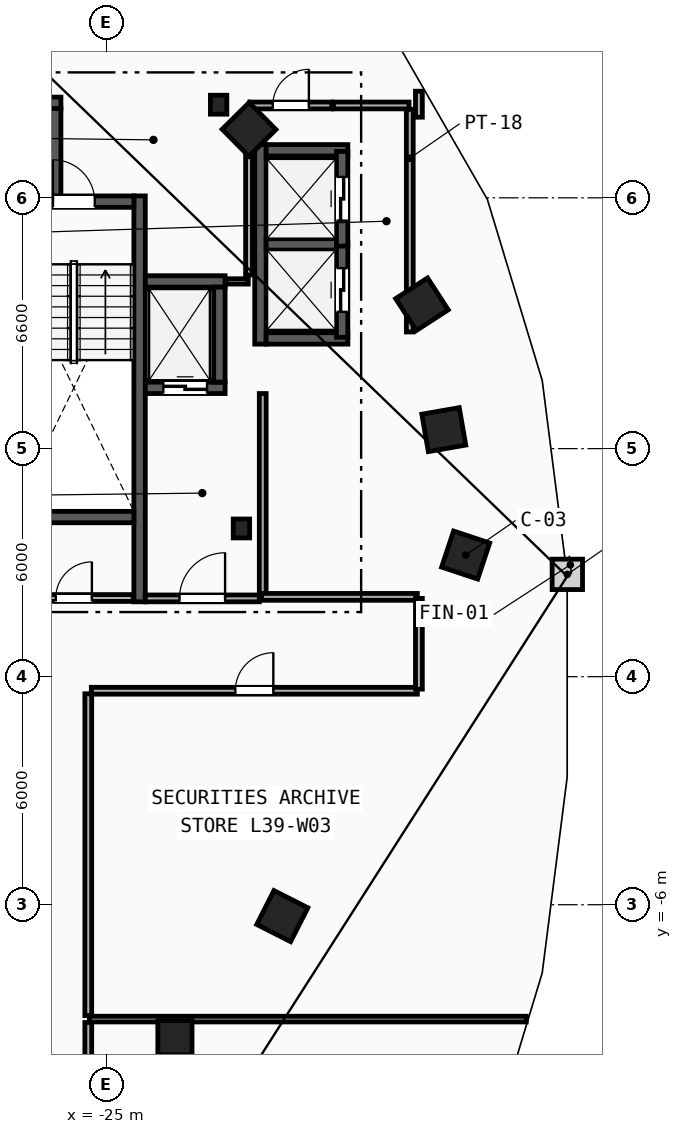
"""IFC4 building model, lengths in metres.
Left out: names, types, materials, properties, quantities, classifications, styles, units other than length and angle.
Written with IfcOpenShell. Run it as: python <this file> out.ifc"""

import sys

from ifc_helpers import new_model, si_unit, direction, frame, frame_2d, origin, origin_2d, place, context, subcontext, project, spatial, rectangle, i_section, extrude, element, fill, save


model = new_model("IFC4")
c1 = context("Model", 3, precision=1e-05, world=origin(), true_north=direction((0.0, 1.0)))
c2 = subcontext(c1, "Body", "Model", "MODEL_VIEW")
j1 = project(units=[si_unit("LENGTHUNIT", "METRE"), si_unit("PLANEANGLEUNIT", "RADIAN")], contexts=[c1])
p1 = place(None, origin())
s1 = spatial("IfcSite", under=j1, at=p1, CompositionType="ELEMENT")
p2 = place(p1, origin())
s2 = spatial("IfcBuilding", under=s1, at=p2, CompositionType="ELEMENT")
p3 = place(p2, frame((0.0, 0.0, 151.2)))
s3 = spatial("IfcBuildingStorey", under=s2, at=p3, CompositionType="ELEMENT", Elevation=151.2)
for number, where, z_axis, x_axis in (
    (1, (-21.45, 3.9, 0.0), (0.0, 0.0, 1.0), (1.0, 0.0, 0.0)),
    (2, (-22.05, 15.05, 0.0), (0.0, 0.0, 1.0), (1.0, 0.0, 0.0)),
):
    element("IfcColumn", number, at=place(p3, frame(where, z_axis=z_axis, x_axis=x_axis)), inside=s3, PredefinedType="COLUMN", context=c2, shape_type="SweptSolid", body=[
        extrude(i_section(OverallWidth=0.432, OverallDepth=0.498, WebThickness=0.056, FlangeThickness=0.089, FilletRadius=0.018, at=origin_2d()), origin(), (0.0, 0.0, 1.0), 3.6),
    ])
p4 = place(p3, frame((-23.2, -9.5, 0.0), z_axis=(0.0, 0.0, 1.0), x_axis=(1.0, 0.0, 0.0)))
e3 = element("IfcColumn", 3, at=p4, inside=s3, PredefinedType="COLUMN", context=c2, shape_type="SweptSolid", body=[
    extrude(rectangle(XDim=0.9, YDim=0.9, at=origin_2d()), origin(), (0.0, 0.0, 1.0), 3.6),
])
for number, where, z_axis, x_axis in (
    (4, (-15.55, 3.2, 0.0), (0.0, 0.0, 1.0), (0.315, 0.949, 0.0)),
    (5, (-16.125, 6.5, 0.0), (0.0, 0.0, 1.0), (-0.172, 0.985, 0.0)),
    (6, (-16.7, 9.8, 0.0), (0.0, 0.0, 1.0), (-0.544, 0.839, 0.0)),
    (7, (-21.25, 14.4, 0.0), (0.0, 0.0, 1.0), (-0.703, 0.711, 0.0)),
    (8, (-20.375, -6.3, 0.0), (0.0, 0.0, 1.0), (0.453, 0.892, 0.0)),
):
    element("IfcColumn", number, at=place(p3, frame(where, z_axis=z_axis, x_axis=x_axis)), inside=s3, PredefinedType="COLUMN", context=c2, shape_type="SweptSolid", body=[
        extrude(rectangle(XDim=1.0, YDim=1.0, at=origin_2d()), origin(), (0.0, 0.0, 1.0), 3.6),
    ])
p5 = place(p3, frame((-24.13, 1.97, 0.0), z_axis=(0.0, 0.0, 1.0), x_axis=(0.0, 1.0, 0.0)))
e9 = element("IfcWall", 9, at=p5, inside=s3, PredefinedType="SHEAR", context=c2, shape_type="SweptSolid", body=[
    extrude(rectangle(XDim=10.68, YDim=0.3, at=frame_2d((5.34, 0.0))), origin(), (0.0, 0.0, 1.0), 3.36),
])
p6 = place(p3, frame((-27.44, 12.5, 0.0), z_axis=(0.0, 0.0, 1.0), x_axis=(1.0, 0.0, 0.0)))
e10 = element("IfcWall", 10, at=p6, inside=s3, PredefinedType="SHEAR", context=c2, shape_type="SweptSolid", body=[
    extrude(rectangle(XDim=3.16, YDim=0.3, at=frame_2d((1.58, 0.0))), origin(), (0.0, 0.0, 1.0), 3.36),
])
p7 = place(p6, frame((1.03, 0.0, 0.0)))
e11 = element("IfcOpeningElement", 11, at=p7, cuts=e10, PredefinedType="OPENING", context=c2, shape_type="SweptSolid", body=[
    extrude(rectangle(XDim=1.1, YDim=2.15, at=frame_2d((0.55, 1.075))), frame((0.0, 0.16, 0.0), z_axis=(0.0, -1.0, 0.0), x_axis=(1.0, 0.0, 0.0)), (0.0, 0.0, 1.0), 0.32),
])
p8 = place(p3, frame((-27.44, 4.2, 0.0), z_axis=(0.0, 0.0, 1.0), x_axis=(1.0, 0.0, 0.0)))
e12 = element("IfcWall", 12, at=p8, inside=s3, PredefinedType="SHEAR", context=c2, shape_type="SweptSolid", body=[
    extrude(rectangle(XDim=3.16, YDim=0.3, at=frame_2d((1.58, 0.0))), origin(), (0.0, 0.0, 1.0), 3.36),
])
p9 = place(p3, frame((-20.89, 2.15, 0.0), z_axis=(0.0, 0.0, 1.0), x_axis=(0.0, 1.0, 0.0)))
e13 = element("IfcWall", 13, at=p9, inside=s3, PredefinedType="PARTITIONING", context=c2, shape_type="SweptSolid", body=[
    extrude(rectangle(XDim=5.3, YDim=0.18, at=frame_2d((2.65, 0.0))), origin(), (0.0, 0.0, 1.0), 3.36),
])
p10 = place(p3, frame((-23.98, 2.06, 0.0), z_axis=(0.0, 0.0, 1.0), x_axis=(1.0, 0.0, 0.0)))
e14 = element("IfcWall", 14, at=p10, inside=s3, PredefinedType="PARTITIONING", context=c2, shape_type="SweptSolid", body=[
    extrude(rectangle(XDim=3.0, YDim=0.18, at=frame_2d((1.5, 0.0))), origin(), (0.0, 0.0, 1.0), 3.36),
])
p11 = place(p10, frame((0.9, 0.0, 0.0)))
e15 = element("IfcOpeningElement", 15, at=p11, cuts=e14, PredefinedType="OPENING", context=c2, shape_type="SweptSolid", body=[
    extrude(rectangle(XDim=1.2, YDim=2.15, at=frame_2d((0.6, 1.075))), frame((0.0, 0.1, 0.0), z_axis=(0.0, -1.0, 0.0), x_axis=(1.0, 0.0, 0.0)), (0.0, 0.0, 1.0), 0.2),
])
p12 = place(p3, frame((-23.98, 7.6, 0.0), z_axis=(0.0, 0.0, 1.0), x_axis=(1.0, 0.0, 0.0)))
e16 = element("IfcWall", 16, at=p12, inside=s3, PredefinedType="SHEAR", context=c2, shape_type="SweptSolid", body=[
    extrude(rectangle(XDim=2.1, YDim=0.3, at=frame_2d((1.05, 0.0))), origin(), (0.0, 0.0, 1.0), 3.36),
])
p13 = place(p12, frame((0.475, 0.0, 0.0)))
e17 = element("IfcOpeningElement", 17, at=p13, cuts=e16, PredefinedType="OPENING", context=c2, shape_type="SweptSolid", body=[
    extrude(rectangle(XDim=1.15, YDim=2.2, at=frame_2d((0.575, 1.1))), frame((0.0, 0.16, 0.0), z_axis=(0.0, -1.0, 0.0), x_axis=(1.0, 0.0, 0.0)), (0.0, 0.0, 1.0), 0.32),
])
p14 = place(p3, frame((-23.98, 10.4, 0.0), z_axis=(0.0, 0.0, 1.0), x_axis=(1.0, 0.0, 0.0)))
e18 = element("IfcWall", 18, at=p14, inside=s3, PredefinedType="SHEAR", context=c2, shape_type="SweptSolid", body=[
    extrude(rectangle(XDim=2.1, YDim=0.3, at=frame_2d((1.05, 0.0))), origin(), (0.0, 0.0, 1.0), 3.36),
])
for number, where, z_axis, x_axis in (
    (19, (-22.03, 7.75, 0.0), (0.0, 0.0, 1.0), (0.0, 1.0, 0.0)),
    (20, (-28.7, 15.1, 0.0), (0.0, 0.0, 1.0), (1.0, 0.0, 0.0)),
):
    element("IfcWall", number, at=place(p3, frame(where, z_axis=z_axis, x_axis=x_axis)), inside=s3, PredefinedType="SHEAR", context=c2, shape_type="SweptSolid", body=[
        extrude(rectangle(XDim=2.5, YDim=0.3, at=frame_2d((1.25, 0.0))), origin(), (0.0, 0.0, 1.0), 3.36),
    ])
p15 = place(p3, frame((-26.35, 12.65, 0.0), z_axis=(0.0, 0.0, 1.0), x_axis=(0.0, 1.0, 0.0)))
e21 = element("IfcWall", 21, at=p15, inside=s3, PredefinedType="SHEAR", context=c2, shape_type="SweptSolid", body=[
    extrude(rectangle(XDim=2.3, YDim=0.3, at=frame_2d((1.15, 0.0))), origin(), (0.0, 0.0, 1.0), 3.36),
])
p16 = place(p3, frame((-20.95, 8.75, 0.0), z_axis=(0.0, 0.0, 1.0), x_axis=(0.0, 1.0, 0.0)))
e22 = element("IfcWall", 22, at=p16, inside=s3, PredefinedType="SHEAR", context=c2, shape_type="SweptSolid", body=[
    extrude(rectangle(XDim=5.25, YDim=0.3, at=frame_2d((2.625, 0.0))), origin(), (0.0, 0.0, 1.0), 3.36),
])
for number, where, z_axis, x_axis in (
    (23, (-20.8, 8.9, 0.0), (0.0, 0.0, 1.0), (1.0, 0.0, 0.0)),
    (24, (-20.8, 13.85, 0.0), (0.0, 0.0, 1.0), (1.0, 0.0, 0.0)),
):
    element("IfcWall", number, at=place(p3, frame(where, z_axis=z_axis, x_axis=x_axis)), inside=s3, PredefinedType="SHEAR", context=c2, shape_type="SweptSolid", body=[
        extrude(rectangle(XDim=2.15, YDim=0.3, at=frame_2d((1.075, 0.0))), origin(), (0.0, 0.0, 1.0), 3.36),
    ])
p17 = place(p3, frame((-20.8, 11.375, 0.0), z_axis=(0.0, 0.0, 1.0), x_axis=(1.0, 0.0, 0.0)))
e25 = element("IfcWall", 25, at=p17, inside=s3, PredefinedType="SHEAR", context=c2, shape_type="SweptSolid", body=[
    extrude(rectangle(XDim=1.85, YDim=0.3, at=frame_2d((0.925, 0.0))), origin(), (0.0, 0.0, 1.0), 3.36),
])
p18 = place(p3, frame((-18.8, 8.93, 0.0), z_axis=(0.0, 0.0, 1.0), x_axis=(0.0, 1.0, 0.0)))
e26 = element("IfcWall", 26, at=p18, inside=s3, PredefinedType="SHEAR", context=c2, shape_type="SweptSolid", body=[
    extrude(rectangle(XDim=2.49, YDim=0.3, at=frame_2d((1.245, 0.0))), origin(), (0.0, 0.0, 1.0), 3.36),
])
p19 = place(p18, frame((0.67, 0.0, 0.0)))
e27 = element("IfcOpeningElement", 27, at=p19, cuts=e26, PredefinedType="OPENING", context=c2, shape_type="SweptSolid", body=[
    extrude(rectangle(XDim=1.15, YDim=2.2, at=frame_2d((0.575, 1.1))), frame((0.0, 0.16, 0.0), z_axis=(0.0, -1.0, 0.0), x_axis=(1.0, 0.0, 0.0)), (0.0, 0.0, 1.0), 0.32),
])
p20 = place(p3, frame((-18.8, 11.33, 0.0), z_axis=(0.0, 0.0, 1.0), x_axis=(0.0, 1.0, 0.0)))
e28 = element("IfcWall", 28, at=p20, inside=s3, PredefinedType="SHEAR", context=c2, shape_type="SweptSolid", body=[
    extrude(rectangle(XDim=2.49, YDim=0.3, at=frame_2d((1.245, 0.0))), origin(), (0.0, 0.0, 1.0), 3.36),
])
p21 = place(p20, frame((0.67, 0.0, 0.0)))
e29 = element("IfcOpeningElement", 29, at=p21, cuts=e28, PredefinedType="OPENING", context=c2, shape_type="SweptSolid", body=[
    extrude(rectangle(XDim=1.15, YDim=2.2, at=frame_2d((0.575, 1.1))), frame((0.0, 0.16, 0.0), z_axis=(0.0, -1.0, 0.0), x_axis=(1.0, 0.0, 0.0)), (0.0, 0.0, 1.0), 0.32),
])
p22 = place(p3, frame((-17.02, 9.07, 0.0), z_axis=(0.0, 0.0, 1.0), x_axis=(0.0, 1.0, 0.0)))
e30 = element("IfcWall", 30, at=p22, inside=s3, PredefinedType="PARTITIONING", context=c2, shape_type="SweptSolid", body=[
    extrude(rectangle(XDim=5.86, YDim=0.18, at=frame_2d((2.93, 0.0))), origin(), (0.0, 0.0, 1.0), 3.36),
])
p23 = place(p3, frame((-21.23, 15.03, 0.0), z_axis=(0.0, 0.0, 1.0), x_axis=(1.0, 0.0, 0.0)))
e31 = element("IfcWall", 31, at=p23, inside=s3, PredefinedType="PARTITIONING", context=c2, shape_type="SweptSolid", body=[
    extrude(rectangle(XDim=2.16, YDim=0.18, at=frame_2d((1.08, 0.0))), origin(), (0.0, 0.0, 1.0), 3.36),
])
p24 = place(p23, frame((0.605, 0.0, 0.0)))
e32 = element("IfcOpeningElement", 32, at=p24, cuts=e31, PredefinedType="OPENING", context=c2, shape_type="SweptSolid", body=[
    extrude(rectangle(XDim=0.95, YDim=2.1, at=frame_2d((0.475, 1.05))), frame((0.0, 0.1, 0.0), z_axis=(0.0, -1.0, 0.0), x_axis=(1.0, 0.0, 0.0)), (0.0, 0.0, 1.0), 0.2),
])
p25 = place(p3, frame((-19.03, 15.03, 0.0), z_axis=(0.0, 0.0, 1.0), x_axis=(1.0, 0.0, 0.0)))
e33 = element("IfcWall", 33, at=p25, inside=s3, PredefinedType="PARTITIONING", context=c2, shape_type="SweptSolid", body=[
    extrude(rectangle(XDim=1.99, YDim=0.18, at=frame_2d((0.995, 0.0))), origin(), (0.0, 0.0, 1.0), 3.36),
])
p26 = place(p3, frame((-21.86, 10.4, 0.0), z_axis=(0.0, 0.0, 1.0), x_axis=(1.0, 0.0, 0.0)))
e34 = element("IfcWall", 34, at=p26, inside=s3, PredefinedType="PARTITIONING", context=c2, shape_type="SweptSolid", body=[
    extrude(rectangle(XDim=0.59, YDim=0.14, at=frame_2d((0.295, 0.0))), origin(), (0.0, 0.0, 1.0), 3.36),
])
p27 = place(p3, frame((-21.25, 10.57, 0.0), z_axis=(0.0, 0.0, 1.0), x_axis=(0.0, 1.0, 0.0)))
e35 = element("IfcWall", 35, at=p27, inside=s3, PredefinedType="PARTITIONING", context=c2, shape_type="SweptSolid", body=[
    extrude(rectangle(XDim=4.36, YDim=0.18, at=frame_2d((2.18, 0.0))), origin(), (0.0, 0.0, 1.0), 3.36),
])
p28 = place(p3, frame((-27.42, 2.07, 0.0), z_axis=(0.0, 0.0, 1.0), x_axis=(1.0, 0.0, 0.0)))
e36 = element("IfcWall", 36, at=p28, inside=s3, PredefinedType="PARTITIONING", context=c2, shape_type="SweptSolid", body=[
    extrude(rectangle(XDim=3.12, YDim=0.18, at=frame_2d((1.56, 0.0))), origin(), (0.0, 0.0, 1.0), 3.36),
])
p29 = place(p28, frame((1.085, 0.0, 0.0)))
e37 = element("IfcOpeningElement", 37, at=p29, cuts=e36, PredefinedType="OPENING", context=c2, shape_type="SweptSolid", body=[
    extrude(rectangle(XDim=0.95, YDim=2.1, at=frame_2d((0.475, 1.05))), frame((0.0, 0.1, 0.0), z_axis=(0.0, -1.0, 0.0), x_axis=(1.0, 0.0, 0.0)), (0.0, 0.0, 1.0), 0.2),
])
p30 = place(p3, frame((-25.45, -9.01, 0.0), z_axis=(0.0, 0.0, 1.0), x_axis=(1.0, 0.0, 0.0)))
e38 = element("IfcWall", 38, at=p30, inside=s3, PredefinedType="PARTITIONING", context=c2, shape_type="SweptSolid", body=[
    extrude(rectangle(XDim=11.495, YDim=0.15, at=frame_2d((5.748, 0.0))), origin(), (0.0, 0.0, 1.0), 3.36),
])
p31 = place(p3, frame((-25.48, -11.178, 0.0), z_axis=(0.0, 0.0, 1.0), x_axis=(0.0, 1.0, 0.0)))
e39 = element("IfcWall", 39, at=p31, inside=s3, PredefinedType="PARTITIONING", context=c2, shape_type="SweptSolid", body=[
    extrude(rectangle(XDim=2.078, YDim=0.18, at=frame_2d((1.039, 0.0))), origin(), (0.0, 0.0, 1.0), 3.36),
])
p32 = place(p3, frame((-25.4, -0.37, 0.0), z_axis=(0.0, 0.0, 1.0), x_axis=(1.0, 0.0, 0.0)))
e40 = element("IfcWall", 40, at=p32, inside=s3, PredefinedType="PARTITIONING", context=c2, shape_type="SweptSolid", body=[
    extrude(rectangle(XDim=8.578, YDim=0.18, at=frame_2d((4.289, 0.0))), origin(), (0.0, 0.0, 1.0), 3.36),
])
p33 = place(p32, frame((3.789, 0.0, 0.0)))
e41 = element("IfcOpeningElement", 41, at=p33, cuts=e40, PredefinedType="OPENING", context=c2, shape_type="SweptSolid", body=[
    extrude(rectangle(XDim=1.0, YDim=2.15, at=frame_2d((0.5, 1.075))), frame((0.0, 0.1, 0.0), z_axis=(0.0, -1.0, 0.0), x_axis=(1.0, 0.0, 0.0)), (0.0, 0.0, 1.0), 0.2),
])
p34 = place(p3, frame((-25.48, -8.92, 0.0), z_axis=(0.0, 0.0, 1.0), x_axis=(0.0, 1.0, 0.0)))
e42 = element("IfcWall", 42, at=p34, inside=s3, PredefinedType="PARTITIONING", context=c2, shape_type="SweptSolid", body=[
    extrude(rectangle(XDim=8.47, YDim=0.18, at=frame_2d((4.235, 0.0))), origin(), (0.0, 0.0, 1.0), 3.36),
])
p35 = place(p3, frame((-16.822, 2.1, 0.0), z_axis=(0.0, 0.0, 1.0), x_axis=(-1.0, 0.0, 0.0)))
e43 = element("IfcWall", 43, at=p35, inside=s3, PredefinedType="PARTITIONING", context=c2, shape_type="SweptSolid", body=[
    extrude(rectangle(XDim=4.098, YDim=0.18, at=frame_2d((2.049, 0.0))), origin(), (0.0, 0.0, 1.0), 3.36),
])
p36 = place(p3, frame((-16.78, -0.329, 0.0), z_axis=(0.0, 0.0, 1.0), x_axis=(0.0, 1.0, 0.0)))
e44 = element("IfcWall", 44, at=p36, inside=s3, PredefinedType="PARTITIONING", context=c2, shape_type="SweptSolid", body=[
    extrude(rectangle(XDim=2.387, YDim=0.18, at=frame_2d((1.194, 0.0))), origin(), (0.0, 0.0, 1.0), 3.36),
])
p37 = place(p3, frame((-16.78, 14.721, 0.0), z_axis=(0.0, 0.0, 1.0), x_axis=(0.0, 1.0, 0.0)))
e45 = element("IfcWall", 45, at=p37, inside=s3, PredefinedType="PARTITIONING", context=c2, shape_type="SweptSolid", body=[
    extrude(rectangle(XDim=0.684, YDim=0.18, at=frame_2d((0.342, 0.0))), origin(), (0.0, 0.0, 1.0), 3.36),
])
p38 = place(p7, origin())
e46 = element("IfcDoor", 46, at=p38, inside=s3, OperationType="SINGLE_SWING_LEFT", PredefinedType="DOOR", context=c2, shape_type="SweptSolid", body=[
    extrude(rectangle(XDim=1.1, YDim=2.15, at=frame_2d((0.55, 1.075))), frame((0.0, 0.025, 0.0), z_axis=(0.0, -1.0, 0.0), x_axis=(1.0, 0.0, 0.0)), (0.0, 0.0, 1.0), 0.05),
])
fill(e11, e46)
p39 = place(p11, origin())
e47 = element("IfcDoor", 47, at=p39, inside=s3, OperationType="SINGLE_SWING_RIGHT", PredefinedType="DOOR", context=c2, shape_type="SweptSolid", body=[
    extrude(rectangle(XDim=1.2, YDim=2.15, at=frame_2d((0.6, 1.075))), frame((0.0, 0.025, 0.0), z_axis=(0.0, -1.0, 0.0), x_axis=(1.0, 0.0, 0.0)), (0.0, 0.0, 1.0), 0.05),
])
fill(e15, e47)
p40 = place(p13, origin())
e48 = element("IfcDoor", 48, at=p40, inside=s3, OperationType="SLIDING_TO_LEFT", PredefinedType="TRAPDOOR", context=c2, shape_type="SweptSolid", body=[
    extrude(rectangle(XDim=1.15, YDim=2.2, at=frame_2d((0.575, 1.1))), frame((0.0, 0.025, 0.0), z_axis=(0.0, -1.0, 0.0), x_axis=(1.0, 0.0, 0.0)), (0.0, 0.0, 1.0), 0.05),
])
fill(e17, e48)
p41 = place(p19, origin())
e49 = element("IfcDoor", 49, at=p41, inside=s3, OperationType="SLIDING_TO_LEFT", PredefinedType="TRAPDOOR", context=c2, shape_type="SweptSolid", body=[
    extrude(rectangle(XDim=1.15, YDim=2.2, at=frame_2d((0.575, 1.1))), frame((0.0, 0.025, 0.0), z_axis=(0.0, -1.0, 0.0), x_axis=(1.0, 0.0, 0.0)), (0.0, 0.0, 1.0), 0.05),
])
fill(e27, e49)
p42 = place(p21, origin())
e50 = element("IfcDoor", 50, at=p42, inside=s3, OperationType="SLIDING_TO_LEFT", PredefinedType="TRAPDOOR", context=c2, shape_type="SweptSolid", body=[
    extrude(rectangle(XDim=1.15, YDim=2.2, at=frame_2d((0.575, 1.1))), frame((0.0, 0.025, 0.0), z_axis=(0.0, -1.0, 0.0), x_axis=(1.0, 0.0, 0.0)), (0.0, 0.0, 1.0), 0.05),
])
fill(e29, e50)
p43 = place(p33, origin())
e51 = element("IfcDoor", 51, at=p43, inside=s3, OperationType="SINGLE_SWING_RIGHT", PredefinedType="DOOR", context=c2, shape_type="SweptSolid", body=[
    extrude(rectangle(XDim=1.0, YDim=2.15, at=frame_2d((0.5, 1.075))), frame((0.0, 0.025, 0.0), z_axis=(0.0, -1.0, 0.0), x_axis=(1.0, 0.0, 0.0)), (0.0, 0.0, 1.0), 0.05),
])
fill(e41, e51)
p44 = place(p29, origin())
e52 = element("IfcDoor", 52, at=p44, inside=s3, OperationType="SINGLE_SWING_RIGHT", PredefinedType="DOOR", context=c2, shape_type="SweptSolid", body=[
    extrude(rectangle(XDim=0.95, YDim=2.1, at=frame_2d((0.475, 1.05))), frame((0.0, 0.025, 0.0), z_axis=(0.0, -1.0, 0.0), x_axis=(1.0, 0.0, 0.0)), (0.0, 0.0, 1.0), 0.05),
])
fill(e37, e52)
p45 = place(p24, origin())
e53 = element("IfcDoor", 53, at=p45, inside=s3, OperationType="SINGLE_SWING_RIGHT", PredefinedType="DOOR", context=c2, shape_type="SweptSolid", body=[
    extrude(rectangle(XDim=0.95, YDim=2.1, at=frame_2d((0.475, 1.05))), frame((0.0, 0.025, 0.0), z_axis=(0.0, -1.0, 0.0), x_axis=(1.0, 0.0, 0.0)), (0.0, 0.0, 1.0), 0.05),
])
fill(e32, e53)
save(model, sys.argv[1])
